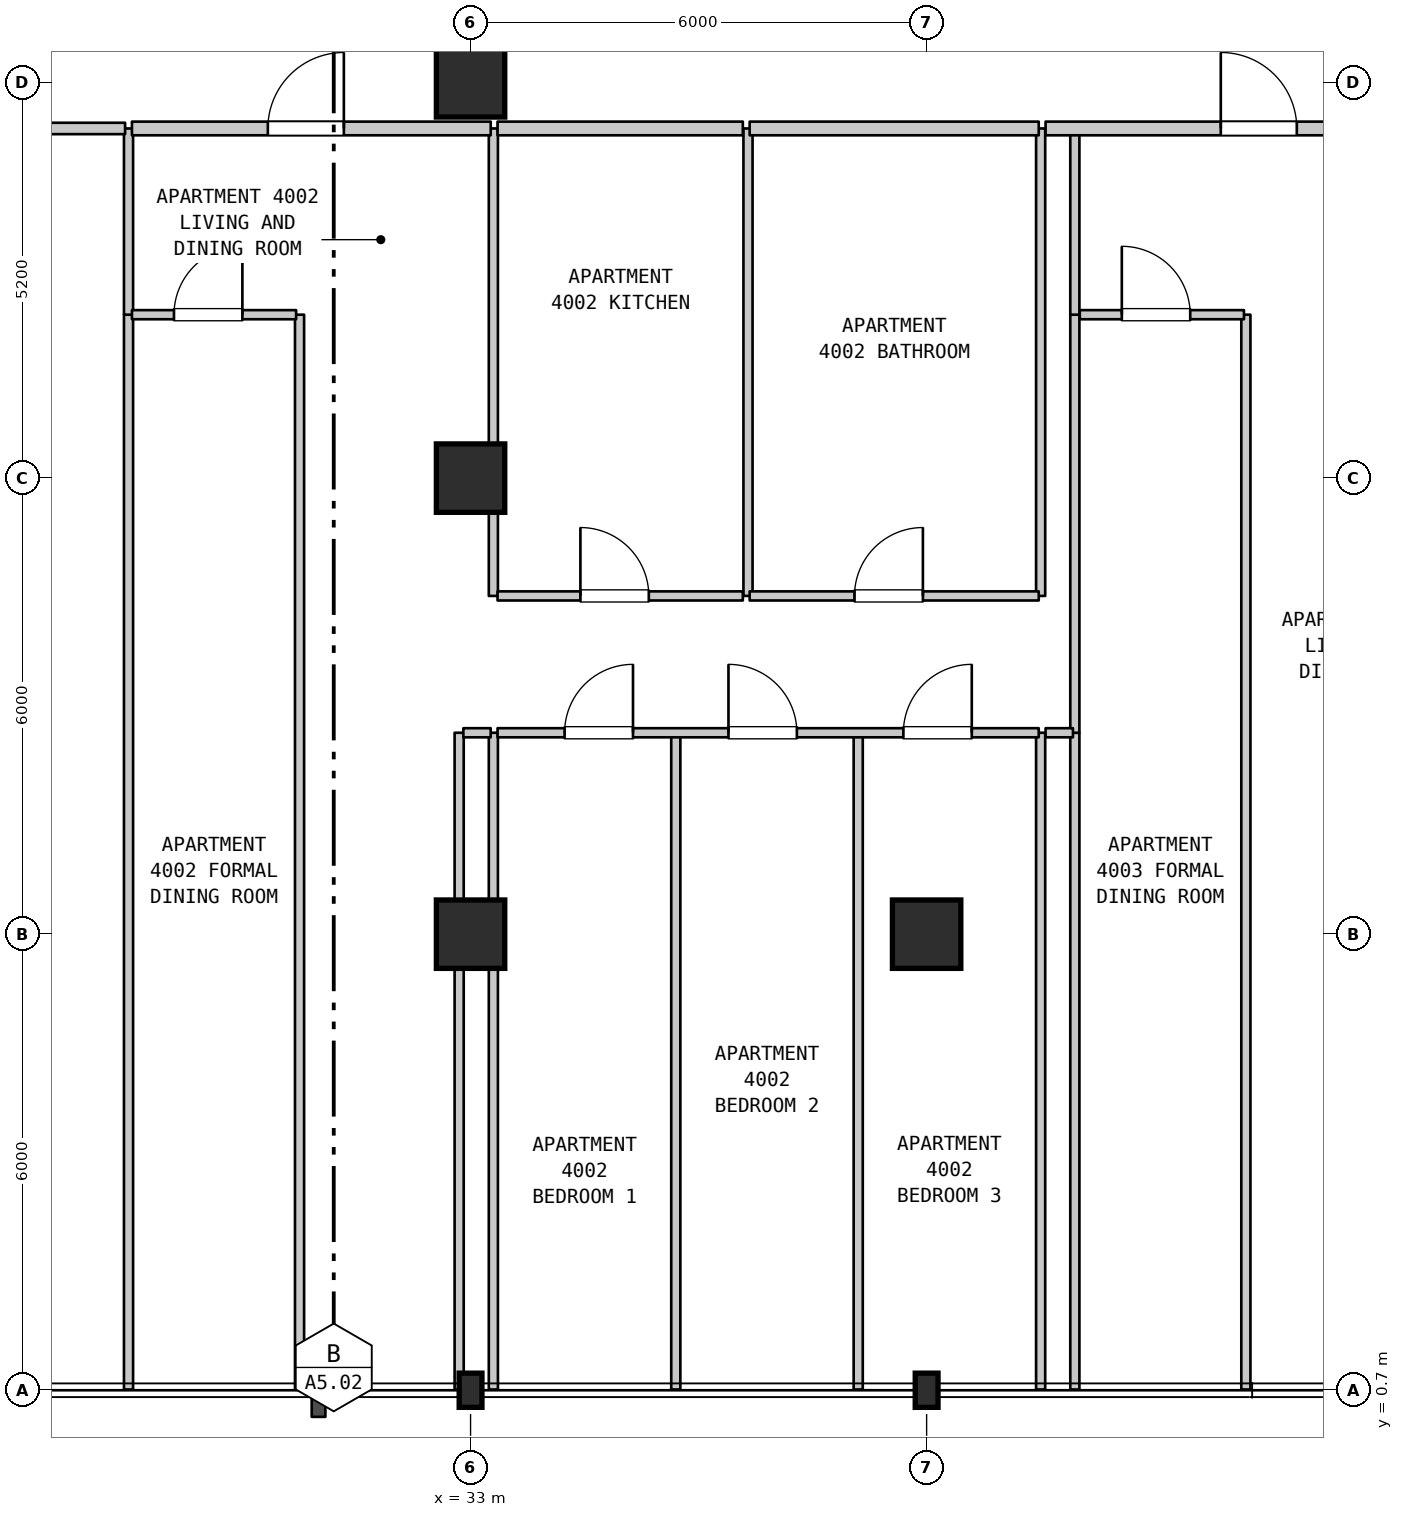
"""IFC4 building model, lengths in metres.
Left out: names, types, materials, properties, quantities, classifications, styles, units other than length and angle.
Written with IfcOpenShell. Run it as: python <this file> out.ifc"""

import sys

from ifc_helpers import new_model, si_unit, direction, frame, frame_2d, origin, origin_2d, place, context, subcontext, project, spatial, rectangle, i_section, extrude, element, fill, save


model = new_model("IFC4")
c1 = context("Model", 3, precision=1e-05, world=origin(), true_north=direction((0.0, 1.0)))
c2 = subcontext(c1, "Body", "Model", "MODEL_VIEW")
j1 = project(units=[si_unit("LENGTHUNIT", "METRE"), si_unit("PLANEANGLEUNIT", "RADIAN")], contexts=[c1])
p1 = place(None, origin())
s1 = spatial("IfcSite", under=j1, at=p1, CompositionType="ELEMENT")
p2 = place(p1, origin())
s2 = spatial("IfcBuilding", under=s1, at=p2, CompositionType="ELEMENT")
p3 = place(p2, frame((0.0, 0.0, 164.6)))
s3 = spatial("IfcBuildingStorey", under=s2, at=p3, CompositionType="ELEMENT", Elevation=164.6)
p4 = place(p3, frame((33.0, 0.7, 0.0), z_axis=(0.0, 0.0, 1.0), x_axis=(1.0, 0.0, 0.0)))
e1 = element("IfcColumn", 1, at=p4, inside=s3, PredefinedType="COLUMN", context=c2, shape_type="SweptSolid", body=[
    extrude(i_section(OverallWidth=0.3, OverallDepth=0.45, WebThickness=0.014, FlangeThickness=0.026, FilletRadius=0.027, at=origin_2d()), origin(), (0.0, 0.0, 1.0), 4.5),
])
for number, where, z_axis, x_axis in (
    (2, (33.0, 6.7, 0.0), (0.0, 0.0, 1.0), (1.0, 0.0, 0.0)),
    (3, (33.0, 12.7, 0.0), (0.0, 0.0, 1.0), (1.0, 0.0, 0.0)),
    (4, (33.0, 17.9, 0.0), (0.0, 0.0, 1.0), (1.0, 0.0, 0.0)),
):
    element("IfcColumn", number, at=place(p3, frame(where, z_axis=z_axis, x_axis=x_axis)), inside=s3, PredefinedType="COLUMN", context=c2, shape_type="SweptSolid", body=[
        extrude(rectangle(XDim=0.9, YDim=0.9, at=origin_2d()), origin(), (0.0, 0.0, 1.0), 4.5),
    ])
p5 = place(p3, frame((39.0, 0.7, 0.0), z_axis=(0.0, 0.0, 1.0), x_axis=(1.0, 0.0, 0.0)))
e5 = element("IfcColumn", 5, at=p5, inside=s3, PredefinedType="COLUMN", context=c2, shape_type="SweptSolid", body=[
    extrude(i_section(OverallWidth=0.3, OverallDepth=0.45, WebThickness=0.014, FlangeThickness=0.026, FilletRadius=0.027, at=origin_2d()), origin(), (0.0, 0.0, 1.0), 4.5),
])
p6 = place(p3, frame((39.0, 6.7, 0.0), z_axis=(0.0, 0.0, 1.0), x_axis=(1.0, 0.0, 0.0)))
e6 = element("IfcColumn", 6, at=p6, inside=s3, PredefinedType="COLUMN", context=c2, shape_type="SweptSolid", body=[
    extrude(rectangle(XDim=0.9, YDim=0.9, at=origin_2d()), origin(), (0.0, 0.0, 1.0), 4.5),
])
p7 = place(p3, frame((28.5, 0.71, 0.0), z_axis=(0.0, 0.0, 1.0), x_axis=(0.0, 1.0, 0.0)))
e7 = element("IfcWall", 7, at=p7, inside=s3, PredefinedType="PARTITIONING", context=c2, shape_type="SweptSolid", body=[
    extrude(rectangle(XDim=14.14, YDim=0.12, at=frame_2d((7.07, 0.0))), origin(), (0.0, 0.0, 1.0), 4.19),
])
p8 = place(p3, frame((28.5, 14.85, 0.0), z_axis=(0.0, 0.0, 1.0), x_axis=(0.0, 1.0, 0.0)))
e8 = element("IfcWall", 8, at=p8, inside=s3, PredefinedType="PARTITIONING", context=c2, shape_type="SweptSolid", body=[
    extrude(rectangle(XDim=2.45, YDim=0.12, at=frame_2d((1.225, 0.0))), origin(), (0.0, 0.0, 1.0), 4.19),
])
p9 = place(p3, frame((30.75, 0.71, 0.0), z_axis=(0.0, 0.0, 1.0), x_axis=(0.0, 1.0, 0.0)))
e9 = element("IfcWall", 9, at=p9, inside=s3, PredefinedType="PARTITIONING", context=c2, shape_type="SweptSolid", body=[
    extrude(rectangle(XDim=14.14, YDim=0.12, at=frame_2d((7.07, 0.0))), origin(), (0.0, 0.0, 1.0), 4.19),
])
for number, where, z_axis, x_axis in (
    (10, (32.85, 0.71, 0.0), (0.0, 0.0, 1.0), (0.0, 1.0, 0.0)),
    (11, (33.3, 0.71, 0.0), (0.0, 0.0, 1.0), (0.0, 1.0, 0.0)),
):
    element("IfcWall", number, at=place(p3, frame(where, z_axis=z_axis, x_axis=x_axis)), inside=s3, PredefinedType="PARTITIONING", context=c2, shape_type="SweptSolid", body=[
        extrude(rectangle(XDim=8.64, YDim=0.12, at=frame_2d((4.32, 0.0))), origin(), (0.0, 0.0, 1.0), 4.19),
    ])
p10 = place(p3, frame((33.3, 11.15, 0.0), z_axis=(0.0, 0.0, 1.0), x_axis=(0.0, 1.0, 0.0)))
e12 = element("IfcWall", 12, at=p10, inside=s3, PredefinedType="PARTITIONING", context=c2, shape_type="SweptSolid", body=[
    extrude(rectangle(XDim=6.15, YDim=0.12, at=frame_2d((3.075, 0.0))), origin(), (0.0, 0.0, 1.0), 4.19),
])
p11 = place(p3, frame((35.7, 0.71, 0.0), z_axis=(0.0, 0.0, 1.0), x_axis=(0.0, 1.0, 0.0)))
e13 = element("IfcWall", 13, at=p11, inside=s3, PredefinedType="PARTITIONING", context=c2, shape_type="SweptSolid", body=[
    extrude(rectangle(XDim=8.64, YDim=0.12, at=frame_2d((4.32, 0.0))), origin(), (0.0, 0.0, 1.0), 4.19),
])
p12 = place(p3, frame((36.65, 11.15, 0.0), z_axis=(0.0, 0.0, 1.0), x_axis=(0.0, 1.0, 0.0)))
e14 = element("IfcWall", 14, at=p12, inside=s3, PredefinedType="PARTITIONING", context=c2, shape_type="SweptSolid", body=[
    extrude(rectangle(XDim=6.15, YDim=0.12, at=frame_2d((3.075, 0.0))), origin(), (0.0, 0.0, 1.0), 4.19),
])
for number, where, z_axis, x_axis in (
    (15, (38.1, 0.71, 0.0), (0.0, 0.0, 1.0), (0.0, 1.0, 0.0)),
    (16, (40.5, 0.71, 0.0), (0.0, 0.0, 1.0), (0.0, 1.0, 0.0)),
):
    element("IfcWall", number, at=place(p3, frame(where, z_axis=z_axis, x_axis=x_axis)), inside=s3, PredefinedType="PARTITIONING", context=c2, shape_type="SweptSolid", body=[
        extrude(rectangle(XDim=8.64, YDim=0.12, at=frame_2d((4.32, 0.0))), origin(), (0.0, 0.0, 1.0), 4.19),
    ])
p13 = place(p3, frame((40.5, 11.15, 0.0), z_axis=(0.0, 0.0, 1.0), x_axis=(0.0, 1.0, 0.0)))
e17 = element("IfcWall", 17, at=p13, inside=s3, PredefinedType="PARTITIONING", context=c2, shape_type="SweptSolid", body=[
    extrude(rectangle(XDim=6.15, YDim=0.12, at=frame_2d((3.075, 0.0))), origin(), (0.0, 0.0, 1.0), 4.19),
])
p14 = place(p3, frame((40.95, 0.71, 0.0), z_axis=(0.0, 0.0, 1.0), x_axis=(0.0, 1.0, 0.0)))
e18 = element("IfcWall", 18, at=p14, inside=s3, PredefinedType="PARTITIONING", context=c2, shape_type="SweptSolid", body=[
    extrude(rectangle(XDim=8.64, YDim=0.12, at=frame_2d((4.32, 0.0))), origin(), (0.0, 0.0, 1.0), 4.19),
])
p15 = place(p3, frame((40.95, 9.35, 0.0), z_axis=(0.0, 0.0, 1.0), x_axis=(0.0, 1.0, 0.0)))
e19 = element("IfcWall", 19, at=p15, inside=s3, PredefinedType="PARTITIONING", context=c2, shape_type="SweptSolid", body=[
    extrude(rectangle(XDim=5.5, YDim=0.12, at=frame_2d((2.75, 0.0))), origin(), (0.0, 0.0, 1.0), 4.19),
])
p16 = place(p3, frame((40.95, 14.85, 0.0), z_axis=(0.0, 0.0, 1.0), x_axis=(0.0, 1.0, 0.0)))
e20 = element("IfcWall", 20, at=p16, inside=s3, PredefinedType="PARTITIONING", context=c2, shape_type="SweptSolid", body=[
    extrude(rectangle(XDim=2.45, YDim=0.12, at=frame_2d((1.225, 0.0))), origin(), (0.0, 0.0, 1.0), 4.19),
])
p17 = place(p3, frame((43.2, 0.71, 0.0), z_axis=(0.0, 0.0, 1.0), x_axis=(0.0, 1.0, 0.0)))
e21 = element("IfcWall", 21, at=p17, inside=s3, PredefinedType="PARTITIONING", context=c2, shape_type="SweptSolid", body=[
    extrude(rectangle(XDim=14.14, YDim=0.12, at=frame_2d((7.07, 0.0))), origin(), (0.0, 0.0, 1.0), 4.19),
])
p18 = place(p3, frame((32.905, 9.35, 0.0), z_axis=(0.0, 0.0, 1.0), x_axis=(1.0, 0.0, 0.0)))
e22 = element("IfcWall", 22, at=p18, inside=s3, PredefinedType="PARTITIONING", context=c2, shape_type="SweptSolid", body=[
    extrude(rectangle(XDim=0.36, YDim=0.12, at=frame_2d((0.18, 0.0))), origin(), (0.0, 0.0, 1.0), 4.19),
])
p19 = place(p3, frame((33.355, 9.35, 0.0), z_axis=(0.0, 0.0, 1.0), x_axis=(1.0, 0.0, 0.0)))
e23 = element("IfcWall", 23, at=p19, inside=s3, PredefinedType="PARTITIONING", context=c2, shape_type="SweptSolid", body=[
    extrude(rectangle(XDim=7.12, YDim=0.12, at=frame_2d((3.56, 0.0))), origin(), (0.0, 0.0, 1.0), 4.19),
])
p20 = place(p19, frame((0.882, 0.0, 0.0)))
e24 = element("IfcOpeningElement", 24, at=p20, cuts=e23, PredefinedType="OPENING", context=c2, shape_type="SweptSolid", body=[
    extrude(rectangle(XDim=0.9, YDim=2.15, at=frame_2d((0.45, 1.075))), frame((0.0, 0.07, 0.0), z_axis=(0.0, -1.0, 0.0), x_axis=(1.0, 0.0, 0.0)), (0.0, 0.0, 1.0), 0.14),
])
p21 = place(p19, frame((3.038, 0.0, 0.0)))
e25 = element("IfcOpeningElement", 25, at=p21, cuts=e23, PredefinedType="OPENING", context=c2, shape_type="SweptSolid", body=[
    extrude(rectangle(XDim=0.9, YDim=2.15, at=frame_2d((0.45, 1.075))), frame((0.0, 0.07, 0.0), z_axis=(0.0, -1.0, 0.0), x_axis=(1.0, 0.0, 0.0)), (0.0, 0.0, 1.0), 0.14),
])
p22 = place(p19, frame((5.339, 0.0, 0.0)))
e26 = element("IfcOpeningElement", 26, at=p22, cuts=e23, PredefinedType="OPENING", context=c2, shape_type="SweptSolid", body=[
    extrude(rectangle(XDim=0.9, YDim=2.15, at=frame_2d((0.45, 1.075))), frame((0.0, 0.07, 0.0), z_axis=(0.0, -1.0, 0.0), x_axis=(1.0, 0.0, 0.0)), (0.0, 0.0, 1.0), 0.14),
])
p23 = place(p3, frame((40.565, 9.35, 0.0), z_axis=(0.0, 0.0, 1.0), x_axis=(1.0, 0.0, 0.0)))
e27 = element("IfcWall", 27, at=p23, inside=s3, PredefinedType="PARTITIONING", context=c2, shape_type="SweptSolid", body=[
    extrude(rectangle(XDim=0.36, YDim=0.12, at=frame_2d((0.18, 0.0))), origin(), (0.0, 0.0, 1.0), 4.19),
])
p24 = place(p3, frame((33.355, 11.15, 0.0), z_axis=(0.0, 0.0, 1.0), x_axis=(1.0, 0.0, 0.0)))
e28 = element("IfcWall", 28, at=p24, inside=s3, PredefinedType="PARTITIONING", context=c2, shape_type="SweptSolid", body=[
    extrude(rectangle(XDim=3.227, YDim=0.12, at=frame_2d((1.614, 0.0))), origin(), (0.0, 0.0, 1.0), 4.19),
])
p25 = place(p24, frame((1.09, 0.0, 0.0)))
e29 = element("IfcOpeningElement", 29, at=p25, cuts=e28, PredefinedType="OPENING", context=c2, shape_type="SweptSolid", body=[
    extrude(rectangle(XDim=0.9, YDim=2.15, at=frame_2d((0.45, 1.075))), frame((0.0, 0.07, 0.0), z_axis=(0.0, -1.0, 0.0), x_axis=(1.0, 0.0, 0.0)), (0.0, 0.0, 1.0), 0.14),
])
p26 = place(p3, frame((36.672, 11.15, 0.0), z_axis=(0.0, 0.0, 1.0), x_axis=(1.0, 0.0, 0.0)))
e30 = element("IfcWall", 30, at=p26, inside=s3, PredefinedType="PARTITIONING", context=c2, shape_type="SweptSolid", body=[
    extrude(rectangle(XDim=3.803, YDim=0.12, at=frame_2d((1.901, 0.0))), origin(), (0.0, 0.0, 1.0), 4.19),
])
p27 = place(p26, frame((1.379, 0.0, 0.0)))
e31 = element("IfcOpeningElement", 31, at=p27, cuts=e30, PredefinedType="OPENING", context=c2, shape_type="SweptSolid", body=[
    extrude(rectangle(XDim=0.9, YDim=2.1, at=frame_2d((0.45, 1.05))), frame((0.0, 0.07, 0.0), z_axis=(0.0, -1.0, 0.0), x_axis=(1.0, 0.0, 0.0)), (0.0, 0.0, 1.0), 0.14),
])
p28 = place(p3, frame((28.545, 14.85, 0.0), z_axis=(0.0, 0.0, 1.0), x_axis=(1.0, 0.0, 0.0)))
e32 = element("IfcWall", 32, at=p28, inside=s3, PredefinedType="PARTITIONING", context=c2, shape_type="SweptSolid", body=[
    extrude(rectangle(XDim=2.16, YDim=0.12, at=frame_2d((1.08, 0.0))), origin(), (0.0, 0.0, 1.0), 4.19),
])
p29 = place(p28, frame((0.553, 0.0, 0.0)))
e33 = element("IfcOpeningElement", 33, at=p29, cuts=e32, PredefinedType="OPENING", context=c2, shape_type="SweptSolid", body=[
    extrude(rectangle(XDim=0.9, YDim=2.15, at=frame_2d((0.45, 1.075))), frame((0.0, 0.07, 0.0), z_axis=(0.0, -1.0, 0.0), x_axis=(1.0, 0.0, 0.0)), (0.0, 0.0, 1.0), 0.14),
])
p30 = place(p3, frame((41.015, 14.85, 0.0), z_axis=(0.0, 0.0, 1.0), x_axis=(1.0, 0.0, 0.0)))
e34 = element("IfcWall", 34, at=p30, inside=s3, PredefinedType="PARTITIONING", context=c2, shape_type="SweptSolid", body=[
    extrude(rectangle(XDim=2.16, YDim=0.12, at=frame_2d((1.08, 0.0))), origin(), (0.0, 0.0, 1.0), 4.19),
])
p31 = place(p30, frame((0.553, 0.0, 0.0)))
e35 = element("IfcOpeningElement", 35, at=p31, cuts=e34, PredefinedType="OPENING", context=c2, shape_type="SweptSolid", body=[
    extrude(rectangle(XDim=0.9, YDim=2.15, at=frame_2d((0.45, 1.075))), frame((0.0, 0.07, 0.0), z_axis=(0.0, -1.0, 0.0), x_axis=(1.0, 0.0, 0.0)), (0.0, 0.0, 1.0), 0.14),
])
p32 = place(p3, frame((21.045, 17.3, 0.0), z_axis=(0.0, 0.0, 1.0), x_axis=(1.0, 0.0, 0.0)))
e36 = element("IfcWall", 36, at=p32, inside=s3, PredefinedType="STANDARD", context=c2, shape_type="SweptSolid", body=[
    extrude(rectangle(XDim=7.41, YDim=0.15, at=frame_2d((3.705, 0.0))), origin(), (0.0, 0.0, 1.0), 4.19),
])
p33 = place(p32, frame((3.135, 0.0, 0.0)))
e37 = element("IfcOpeningElement", 37, at=p33, cuts=e36, PredefinedType="OPENING", context=c2, shape_type="SweptSolid", body=[
    extrude(rectangle(XDim=1.0, YDim=2.15, at=frame_2d((0.5, 1.075))), frame((0.0, 0.085, 0.0), z_axis=(0.0, -1.0, 0.0), x_axis=(1.0, 0.0, 0.0)), (0.0, 0.0, 1.0), 0.17),
])
p34 = place(p3, frame((28.545, 17.3, 0.0), z_axis=(0.0, 0.0, 1.0), x_axis=(1.0, 0.0, 0.0)))
e38 = element("IfcWall", 38, at=p34, inside=s3, PredefinedType="STANDARD", context=c2, shape_type="SweptSolid", body=[
    extrude(rectangle(XDim=4.72, YDim=0.18, at=frame_2d((2.36, 0.0))), origin(), (0.0, 0.0, 1.0), 4.19),
])
p35 = place(p34, frame((1.788, 0.0, 0.0)))
e39 = element("IfcOpeningElement", 39, at=p35, cuts=e38, PredefinedType="OPENING", context=c2, shape_type="SweptSolid", body=[
    extrude(rectangle(XDim=1.0, YDim=2.15, at=frame_2d((0.5, 1.075))), frame((0.0, 0.1, 0.0), z_axis=(0.0, -1.0, 0.0), x_axis=(1.0, 0.0, 0.0)), (0.0, 0.0, 1.0), 0.2),
])
p36 = place(p3, frame((33.355, 17.3, 0.0), z_axis=(0.0, 0.0, 1.0), x_axis=(1.0, 0.0, 0.0)))
e40 = element("IfcWall", 40, at=p36, inside=s3, PredefinedType="STANDARD", context=c2, shape_type="SweptSolid", body=[
    extrude(rectangle(XDim=3.227, YDim=0.18, at=frame_2d((1.614, 0.0))), origin(), (0.0, 0.0, 1.0), 4.19),
])
p37 = place(p3, frame((36.672, 17.3, 0.0), z_axis=(0.0, 0.0, 1.0), x_axis=(1.0, 0.0, 0.0)))
e41 = element("IfcWall", 41, at=p37, inside=s3, PredefinedType="STANDARD", context=c2, shape_type="SweptSolid", body=[
    extrude(rectangle(XDim=3.803, YDim=0.18, at=frame_2d((1.901, 0.0))), origin(), (0.0, 0.0, 1.0), 4.19),
])
p38 = place(p3, frame((40.565, 17.3, 0.0), z_axis=(0.0, 0.0, 1.0), x_axis=(1.0, 0.0, 0.0)))
e42 = element("IfcWall", 42, at=p38, inside=s3, PredefinedType="STANDARD", context=c2, shape_type="SweptSolid", body=[
    extrude(rectangle(XDim=5.545, YDim=0.18, at=frame_2d((2.772, 0.0))), origin(), (0.0, 0.0, 1.0), 4.19),
])
p39 = place(p38, frame((2.305, 0.0, 0.0)))
e43 = element("IfcOpeningElement", 43, at=p39, cuts=e42, PredefinedType="OPENING", context=c2, shape_type="SweptSolid", body=[
    extrude(rectangle(XDim=1.0, YDim=2.15, at=frame_2d((0.5, 1.075))), frame((0.0, 0.1, 0.0), z_axis=(0.0, -1.0, 0.0), x_axis=(1.0, 0.0, 0.0)), (0.0, 0.0, 1.0), 0.2),
])
p40 = place(p20, origin())
e44 = element("IfcDoor", 44, at=p40, inside=s3, OperationType="SINGLE_SWING_RIGHT", PredefinedType="DOOR", context=c2, shape_type="SweptSolid", body=[
    extrude(rectangle(XDim=0.9, YDim=2.15, at=frame_2d((0.45, 1.075))), frame((0.0, 0.025, 0.0), z_axis=(0.0, -1.0, 0.0), x_axis=(1.0, 0.0, 0.0)), (0.0, 0.0, 1.0), 0.05),
])
fill(e24, e44)
p41 = place(p21, origin())
e45 = element("IfcDoor", 45, at=p41, inside=s3, OperationType="SINGLE_SWING_LEFT", PredefinedType="DOOR", context=c2, shape_type="SweptSolid", body=[
    extrude(rectangle(XDim=0.9, YDim=2.15, at=frame_2d((0.45, 1.075))), frame((0.0, 0.025, 0.0), z_axis=(0.0, -1.0, 0.0), x_axis=(1.0, 0.0, 0.0)), (0.0, 0.0, 1.0), 0.05),
])
fill(e25, e45)
p42 = place(p22, origin())
e46 = element("IfcDoor", 46, at=p42, inside=s3, OperationType="SINGLE_SWING_RIGHT", PredefinedType="DOOR", context=c2, shape_type="SweptSolid", body=[
    extrude(rectangle(XDim=0.9, YDim=2.15, at=frame_2d((0.45, 1.075))), frame((0.0, 0.025, 0.0), z_axis=(0.0, -1.0, 0.0), x_axis=(1.0, 0.0, 0.0)), (0.0, 0.0, 1.0), 0.05),
])
fill(e26, e46)
p43 = place(p25, origin())
e47 = element("IfcDoor", 47, at=p43, inside=s3, OperationType="SINGLE_SWING_LEFT", PredefinedType="DOOR", context=c2, shape_type="SweptSolid", body=[
    extrude(rectangle(XDim=0.9, YDim=2.15, at=frame_2d((0.45, 1.075))), frame((0.0, 0.025, 0.0), z_axis=(0.0, -1.0, 0.0), x_axis=(1.0, 0.0, 0.0)), (0.0, 0.0, 1.0), 0.05),
])
fill(e29, e47)
p44 = place(p27, origin())
e48 = element("IfcDoor", 48, at=p44, inside=s3, OperationType="SINGLE_SWING_RIGHT", PredefinedType="DOOR", context=c2, shape_type="SweptSolid", body=[
    extrude(rectangle(XDim=0.9, YDim=2.1, at=frame_2d((0.45, 1.05))), frame((0.0, 0.025, 0.0), z_axis=(0.0, -1.0, 0.0), x_axis=(1.0, 0.0, 0.0)), (0.0, 0.0, 1.0), 0.05),
])
fill(e31, e48)
p45 = place(p29, origin())
e49 = element("IfcDoor", 49, at=p45, inside=s3, OperationType="SINGLE_SWING_RIGHT", PredefinedType="DOOR", context=c2, shape_type="SweptSolid", body=[
    extrude(rectangle(XDim=0.9, YDim=2.15, at=frame_2d((0.45, 1.075))), frame((0.0, 0.025, 0.0), z_axis=(0.0, -1.0, 0.0), x_axis=(1.0, 0.0, 0.0)), (0.0, 0.0, 1.0), 0.05),
])
fill(e33, e49)
p46 = place(p31, origin())
e50 = element("IfcDoor", 50, at=p46, inside=s3, OperationType="SINGLE_SWING_LEFT", PredefinedType="DOOR", context=c2, shape_type="SweptSolid", body=[
    extrude(rectangle(XDim=0.9, YDim=2.15, at=frame_2d((0.45, 1.075))), frame((0.0, 0.025, 0.0), z_axis=(0.0, -1.0, 0.0), x_axis=(1.0, 0.0, 0.0)), (0.0, 0.0, 1.0), 0.05),
])
fill(e35, e50)
p47 = place(p35, origin())
e51 = element("IfcDoor", 51, at=p47, inside=s3, OperationType="SINGLE_SWING_RIGHT", PredefinedType="DOOR", context=c2, shape_type="SweptSolid", body=[
    extrude(rectangle(XDim=1.0, YDim=2.15, at=frame_2d((0.5, 1.075))), frame((0.0, 0.025, 0.0), z_axis=(0.0, -1.0, 0.0), x_axis=(1.0, 0.0, 0.0)), (0.0, 0.0, 1.0), 0.05),
])
fill(e39, e51)
p48 = place(p39, origin())
e52 = element("IfcDoor", 52, at=p48, inside=s3, OperationType="SINGLE_SWING_LEFT", PredefinedType="DOOR", context=c2, shape_type="SweptSolid", body=[
    extrude(rectangle(XDim=1.0, YDim=2.15, at=frame_2d((0.5, 1.075))), frame((0.0, 0.025, 0.0), z_axis=(0.0, -1.0, 0.0), x_axis=(1.0, 0.0, 0.0)), (0.0, 0.0, 1.0), 0.05),
])
fill(e43, e52)
save(model, sys.argv[1])
